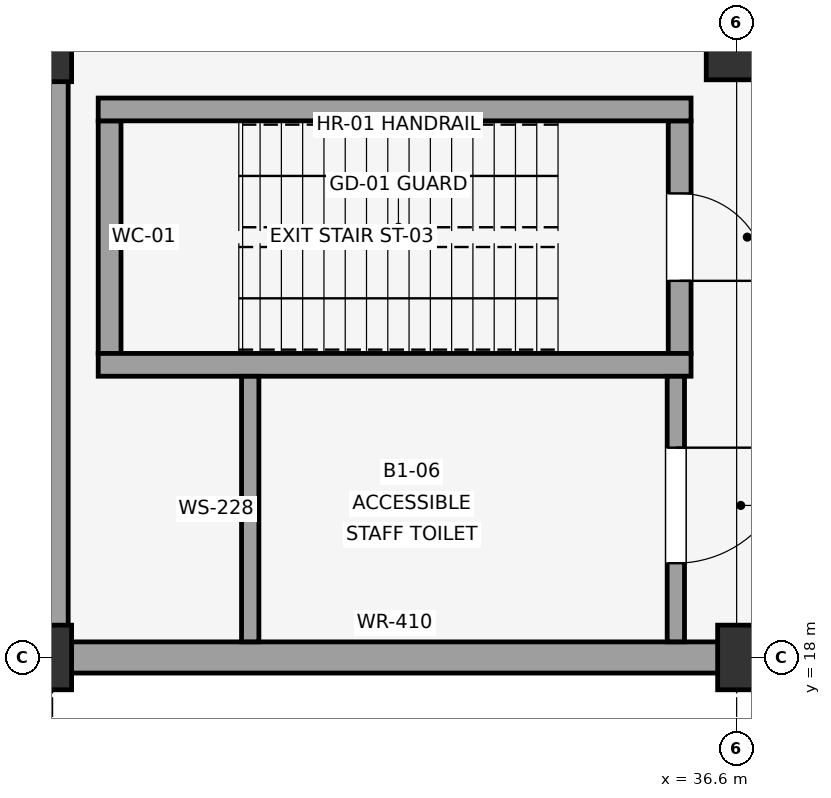
"""IFC4 building model, lengths in metres.
Left out: names, types, materials, properties, quantities, classifications, styles, units other than length and angle.
Written with IfcOpenShell. Run it as: python <this file> out.ifc"""

import sys

from ifc_helpers import new_model, si_unit, direction, frame, frame_2d, origin, origin_2d, place, context, subcontext, project, spatial, rectangle, extrude, element, fill, save


model = new_model("IFC4")
c1 = context("Model", 3, precision=1e-05, world=origin(), true_north=direction((0.0, 1.0)))
c2 = subcontext(c1, "Body", "Model", "MODEL_VIEW")
j1 = project(units=[si_unit("LENGTHUNIT", "METRE"), si_unit("PLANEANGLEUNIT", "RADIAN")], contexts=[c1])
p1 = place(None, origin())
s1 = spatial("IfcSite", under=j1, at=p1, CompositionType="ELEMENT")
p2 = place(p1, origin())
s2 = spatial("IfcBuilding", under=s1, at=p2, CompositionType="ELEMENT")
p3 = place(p2, frame((0.0, 0.0, -4.8)))
s3 = spatial("IfcBuildingStorey", under=s2, at=p3, CompositionType="ELEMENT", Elevation=-4.8)
for number, where, z_axis, x_axis in (
    (1, (27.6, 18.0, 0.0), (0.0, 0.0, 1.0), (1.0, 0.0, 0.0)),
    (2, (27.6, 26.0, 0.0), (0.0, 0.0, 1.0), (1.0, 0.0, 0.0)),
    (3, (36.6, 18.0, 0.0), (0.0, 0.0, 1.0), (1.0, 0.0, 0.0)),
):
    element("IfcColumn", number, at=place(p3, frame(where, z_axis=z_axis, x_axis=x_axis)), inside=s3, PredefinedType="COLUMN", context=c2, shape_type="SweptSolid", body=[
        extrude(rectangle(XDim=0.5, YDim=0.85, at=origin_2d()), origin(), (0.0, 0.0, 1.0), 4.8),
    ])
p4 = place(p3, frame((36.6, 26.0, 0.0), z_axis=(0.0, 0.0, 1.0), x_axis=(1.0, 0.0, 0.0)))
e4 = element("IfcColumn", 4, at=p4, inside=s3, PredefinedType="COLUMN", context=c2, shape_type="SweptSolid", body=[
    extrude(rectangle(XDim=0.8, YDim=0.8, at=origin_2d()), origin(), (0.0, 0.0, 1.0), 4.8),
])
p5 = place(p3, frame((27.6, 18.0, 0.0), z_axis=(0.0, 0.0, 1.0), x_axis=(1.0, 0.0, 0.0)))
e5 = element("IfcWall", 5, at=p5, inside=s3, PredefinedType="USERDEFINED", context=c2, shape_type="SweptSolid", body=[
    extrude(rectangle(XDim=9.0, YDim=0.41, at=frame_2d((4.5, 0.0))), origin(), (0.0, 0.0, 1.0), 3.42),
])
p6 = place(p3, frame((36.6, 18.0, 0.0), z_axis=(0.0, 0.0, 1.0), x_axis=(1.0, 0.0, 0.0)))
e6 = element("IfcWall", 6, at=p6, inside=s3, PredefinedType="USERDEFINED", context=c2, shape_type="SweptSolid", body=[
    extrude(rectangle(XDim=9.0, YDim=0.46, at=frame_2d((4.5, 0.0))), origin(), (0.0, 0.0, 1.0), 3.42),
])
p7 = place(p3, frame((27.6, 26.0, 0.0), z_axis=(0.0, 0.0, 1.0), x_axis=(0.0, -1.0, 0.0)))
e7 = element("IfcWall", 7, at=p7, inside=s3, PredefinedType="USERDEFINED", context=c2, shape_type="SweptSolid", body=[
    extrude(rectangle(XDim=7.794, YDim=0.41, at=frame_2d((3.897, 0.0))), origin(), (0.0, 0.0, 1.0), 3.42),
])
p8 = place(p3, frame((35.85, 25.06, 0.0), z_axis=(0.0, 0.0, 1.0), x_axis=(0.0, -1.0, 0.0)))
e8 = element("IfcWall", 8, at=p8, inside=s3, PredefinedType="SHEAR", context=c2, shape_type="SweptSolid", body=[
    extrude(rectangle(XDim=3.06, YDim=0.3, at=frame_2d((1.53, 0.0))), origin(), (0.0, 0.0, 1.0), 4.8),
])
p9 = place(p8, frame((0.955, 0.0, 0.0)))
e9 = element("IfcOpeningElement", 9, at=p9, cuts=e8, PredefinedType="OPENING", context=c2, shape_type="SweptSolid", body=[
    extrude(rectangle(XDim=1.15, YDim=2.15, at=frame_2d((0.575, 1.075))), frame((0.0, 0.16, 0.0), z_axis=(0.0, -1.0, 0.0), x_axis=(1.0, 0.0, 0.0)), (0.0, 0.0, 1.0), 0.32),
])
p10 = place(p3, frame((28.35, 25.06, 0.0), z_axis=(0.0, 0.0, 1.0), x_axis=(0.0, -1.0, 0.0)))
e10 = element("IfcWall", 10, at=p10, inside=s3, PredefinedType="SHEAR", context=c2, shape_type="SweptSolid", body=[
    extrude(rectangle(XDim=3.06, YDim=0.3, at=frame_2d((1.53, 0.0))), origin(), (0.0, 0.0, 1.0), 4.8),
])
for number, where, z_axis, x_axis in (
    (11, (36.0, 25.21, 0.0), (0.0, 0.0, 1.0), (-1.0, 0.0, 0.0)),
    (12, (36.0, 21.85, 0.0), (0.0, 0.0, 1.0), (-1.0, 0.0, 0.0)),
):
    element("IfcWall", number, at=place(p3, frame(where, z_axis=z_axis, x_axis=x_axis)), inside=s3, PredefinedType="SHEAR", context=c2, shape_type="SweptSolid", body=[
        extrude(rectangle(XDim=7.8, YDim=0.3, at=frame_2d((3.9, 0.0))), origin(), (0.0, 0.0, 1.0), 4.8),
    ])
p11 = place(p3, frame((30.2, 18.206, 0.0), z_axis=(0.0, 0.0, 1.0), x_axis=(0.0, 1.0, 0.0)))
e13 = element("IfcWall", 13, at=p11, inside=s3, PredefinedType="PLUMBINGWALL", context=c2, shape_type="SweptSolid", body=[
    extrude(rectangle(XDim=3.493, YDim=0.228, at=frame_2d((1.747, 0.0))), origin(), (0.0, 0.0, 1.0), 2.7),
])
p12 = place(p3, frame((35.8, 21.699, 0.0), z_axis=(0.0, 0.0, 1.0), x_axis=(0.0, -1.0, 0.0)))
e14 = element("IfcWall", 14, at=p12, inside=s3, PredefinedType="PLUMBINGWALL", context=c2, shape_type="SweptSolid", body=[
    extrude(rectangle(XDim=3.493, YDim=0.228, at=frame_2d((1.747, 0.0))), origin(), (0.0, 0.0, 1.0), 2.7),
])
p13 = place(p12, frame((0.939, 0.0, 0.0)))
e15 = element("IfcOpeningElement", 15, at=p13, cuts=e14, PredefinedType="OPENING", context=c2, shape_type="SweptSolid", body=[
    extrude(rectangle(XDim=1.52, YDim=2.2, at=frame_2d((0.76, 1.1))), frame((0.0, 0.124, 0.0), z_axis=(0.0, -1.0, 0.0), x_axis=(1.0, 0.0, 0.0)), (0.0, 0.0, 1.0), 0.248),
])
p14 = place(p9, origin())
e16 = element("IfcDoor", 16, at=p14, inside=s3, OperationType="SINGLE_SWING_RIGHT", PredefinedType="DOOR", context=c2, shape_type="SweptSolid", body=[
    extrude(rectangle(XDim=1.15, YDim=2.15, at=frame_2d((0.575, 1.075))), frame((0.0, 0.025, 0.0), z_axis=(0.0, -1.0, 0.0), x_axis=(1.0, 0.0, 0.0)), (0.0, 0.0, 1.0), 0.05),
])
fill(e9, e16)
p15 = place(p13, origin())
e17 = element("IfcDoor", 17, at=p15, inside=s3, OperationType="SINGLE_SWING_LEFT", PredefinedType="DOOR", context=c2, shape_type="SweptSolid", body=[
    extrude(rectangle(XDim=1.52, YDim=2.2, at=frame_2d((0.76, 1.1))), frame((0.0, 0.025, 0.0), z_axis=(0.0, -1.0, 0.0), x_axis=(1.0, 0.0, 0.0)), (0.0, 0.0, 1.0), 0.05),
])
fill(e15, e17)
save(model, sys.argv[1])
